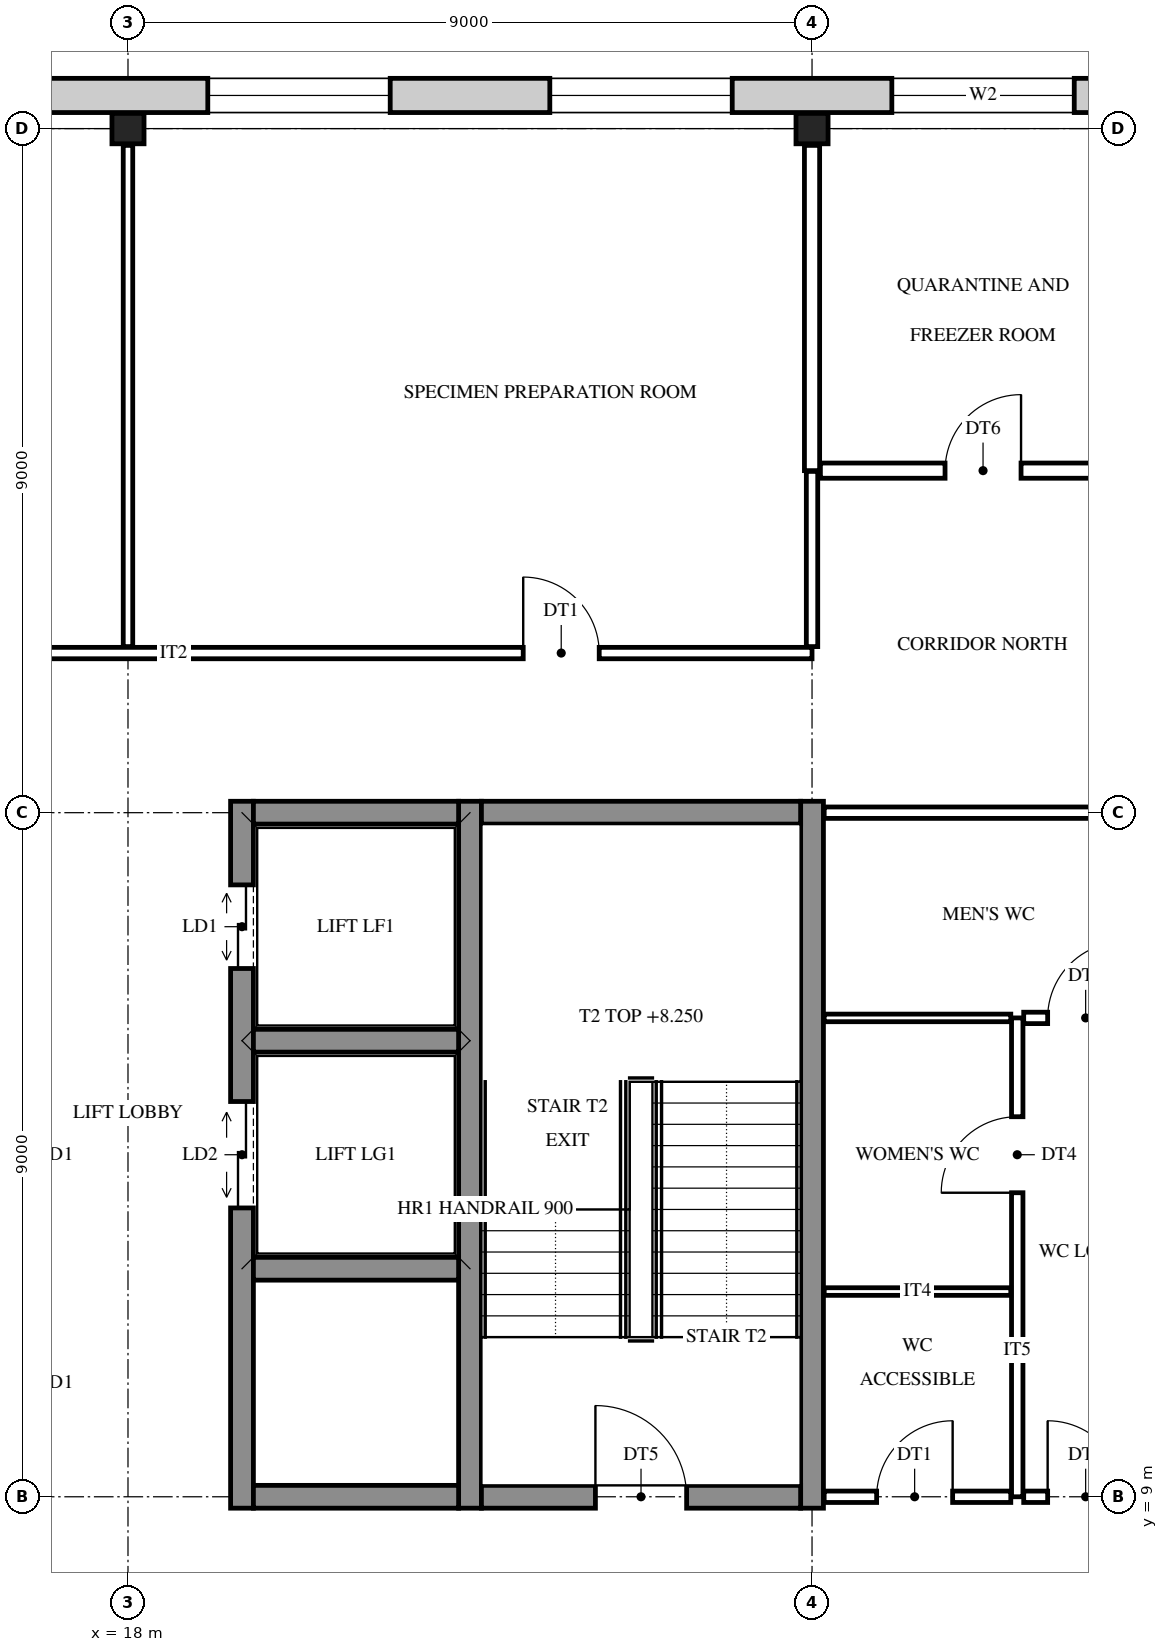
"""IFC4 building model, lengths in metres.
Left out: names, types, materials, properties, quantities, classifications, styles, units other than length and angle.
Written with IfcOpenShell. Run it as: python <this file> out.ifc"""

import sys

from ifc_helpers import new_model, si_unit, direction, frame, frame_2d, origin, origin_2d, place, context, subcontext, project, spatial, rectangle, i_section, extrude, element, fill, save


model = new_model("IFC4")
c1 = context("Model", 3, precision=1e-05, world=origin(), true_north=direction((0.0, 1.0)))
c2 = subcontext(c1, "Body", "Model", "MODEL_VIEW")
j1 = project(units=[si_unit("LENGTHUNIT", "METRE"), si_unit("PLANEANGLEUNIT", "RADIAN")], contexts=[c1])
p1 = place(None, origin())
s1 = spatial("IfcSite", under=j1, at=p1, CompositionType="ELEMENT")
p2 = place(p1, origin())
s2 = spatial("IfcBuilding", under=s1, at=p2, CompositionType="ELEMENT")
p3 = place(p2, frame((0.0, 0.0, 6.0)))
s3 = spatial("IfcBuildingStorey", under=s2, at=p3, CompositionType="ELEMENT", Elevation=6.0)
for number, where, z_axis, x_axis in (
    (1, (18.0, 27.0, 0.0), (0.0, 0.0, 1.0), (0.0, 1.0, 0.0)),
    (2, (27.0, 27.0, 0.0), (0.0, 0.0, 1.0), (0.0, 1.0, 0.0)),
):
    element("IfcColumn", number, at=place(p3, frame(where, z_axis=z_axis, x_axis=x_axis)), inside=s3, PredefinedType="COLUMN", context=c2, shape_type="SweptSolid", body=[
        extrude(i_section(OverallWidth=0.4, OverallDepth=0.422, WebThickness=0.028, FlangeThickness=0.036, at=origin_2d()), origin(), (0.0, 0.0, 1.0), 4.5),
    ])
p4 = place(p3, frame((19.5, 8.85, 0.0), z_axis=(0.0, 0.0, 1.0), x_axis=(0.0, 1.0, 0.0)))
e3 = element("IfcWall", 3, at=p4, inside=s3, PredefinedType="SHEAR", context=c2, shape_type="SweptSolid", body=[
    extrude(rectangle(XDim=9.3, YDim=0.3, at=frame_2d((4.65, 0.0))), origin(), (0.0, 0.0, 1.0), 4.5),
])
p5 = place(p4, frame((3.95, 0.0, 0.0)))
e4 = element("IfcOpeningElement", 4, at=p5, cuts=e3, PredefinedType="OPENING", context=c2, shape_type="SweptSolid", body=[
    extrude(rectangle(XDim=1.4, YDim=2.1, at=frame_2d((0.7, 1.05))), frame((0.0, 0.16, 0.0), z_axis=(0.0, -1.0, 0.0), x_axis=(1.0, 0.0, 0.0)), (0.0, 0.0, 1.0), 0.32),
])
p6 = place(p4, frame((7.1, 0.0, 0.0)))
e5 = element("IfcOpeningElement", 5, at=p6, cuts=e3, PredefinedType="OPENING", context=c2, shape_type="SweptSolid", body=[
    extrude(rectangle(XDim=1.1, YDim=2.1, at=frame_2d((0.55, 1.05))), frame((0.0, 0.16, 0.0), z_axis=(0.0, -1.0, 0.0), x_axis=(1.0, 0.0, 0.0)), (0.0, 0.0, 1.0), 0.32),
])
for number, where, z_axis, x_axis in (
    (6, (22.5, 8.85, 0.0), (0.0, 0.0, 1.0), (0.0, 1.0, 0.0)),
    (7, (27.0, 8.85, 0.0), (0.0, 0.0, 1.0), (0.0, 1.0, 0.0)),
):
    element("IfcWall", number, at=place(p3, frame(where, z_axis=z_axis, x_axis=x_axis)), inside=s3, PredefinedType="SHEAR", context=c2, shape_type="SweptSolid", body=[
        extrude(rectangle(XDim=9.3, YDim=0.3, at=frame_2d((4.65, 0.0))), origin(), (0.0, 0.0, 1.0), 4.5),
    ])
p7 = place(p3, frame((19.65, 9.0, 0.0), z_axis=(0.0, 0.0, 1.0), x_axis=(1.0, 0.0, 0.0)))
e8 = element("IfcWall", 8, at=p7, inside=s3, PredefinedType="SHEAR", context=c2, shape_type="SweptSolid", body=[
    extrude(rectangle(XDim=2.7, YDim=0.3, at=frame_2d((1.35, 0.0))), origin(), (0.0, 0.0, 1.0), 4.5),
])
p8 = place(p3, frame((22.65, 9.0, 0.0), z_axis=(0.0, 0.0, 1.0), x_axis=(1.0, 0.0, 0.0)))
e9 = element("IfcWall", 9, at=p8, inside=s3, PredefinedType="SHEAR", context=c2, shape_type="SweptSolid", body=[
    extrude(rectangle(XDim=4.2, YDim=0.3, at=frame_2d((2.1, 0.0))), origin(), (0.0, 0.0, 1.0), 4.5),
])
p9 = place(p8, frame((1.5, 0.0, 0.0)))
e10 = element("IfcOpeningElement", 10, at=p9, cuts=e9, PredefinedType="OPENING", context=c2, shape_type="SweptSolid", body=[
    extrude(rectangle(XDim=1.2, YDim=2.1, at=frame_2d((0.6, 1.05))), frame((0.0, 0.16, 0.0), z_axis=(0.0, -1.0, 0.0), x_axis=(1.0, 0.0, 0.0)), (0.0, 0.0, 1.0), 0.32),
])
for number, where, z_axis, x_axis in (
    (11, (19.65, 12.0, 0.0), (0.0, 0.0, 1.0), (1.0, 0.0, 0.0)),
    (12, (19.65, 15.0, 0.0), (0.0, 0.0, 1.0), (1.0, 0.0, 0.0)),
    (13, (19.65, 18.0, 0.0), (0.0, 0.0, 1.0), (1.0, 0.0, 0.0)),
):
    element("IfcWall", number, at=place(p3, frame(where, z_axis=z_axis, x_axis=x_axis)), inside=s3, PredefinedType="SHEAR", context=c2, shape_type="SweptSolid", body=[
        extrude(rectangle(XDim=2.7, YDim=0.3, at=frame_2d((1.35, 0.0))), origin(), (0.0, 0.0, 1.0), 4.5),
    ])
p10 = place(p3, frame((22.65, 18.0, 0.0), z_axis=(0.0, 0.0, 1.0), x_axis=(1.0, 0.0, 0.0)))
e14 = element("IfcWall", 14, at=p10, inside=s3, PredefinedType="SHEAR", context=c2, shape_type="SweptSolid", body=[
    extrude(rectangle(XDim=4.2, YDim=0.3, at=frame_2d((2.1, 0.0))), origin(), (0.0, 0.0, 1.0), 4.5),
])
p11 = place(p3, frame((-0.65, 27.436, 0.0), z_axis=(0.0, 0.0, 1.0), x_axis=(1.0, 0.0, 0.0)))
e15 = element("IfcWall", 15, at=p11, inside=s3, PredefinedType="STANDARD", context=c2, shape_type="SweptSolid", body=[
    extrude(rectangle(XDim=32.8, YDim=0.45, at=frame_2d((16.4, 0.0))), origin(), (0.0, 0.0, 1.0), 4.5),
])
p12 = place(p11, frame((1.7, 0.0, 0.9)))
e16 = element("IfcOpeningElement", 16, at=p12, cuts=e15, PredefinedType="OPENING", context=c2, shape_type="SweptSolid", body=[
    extrude(rectangle(XDim=2.4, YDim=2.8, at=frame_2d((1.2, 1.4))), frame((0.0, 0.235, 0.0), z_axis=(0.0, -1.0, 0.0), x_axis=(1.0, 0.0, 0.0)), (0.0, 0.0, 1.0), 0.47),
])
p13 = place(p11, frame((6.2, 0.0, 0.9)))
e17 = element("IfcOpeningElement", 17, at=p13, cuts=e15, PredefinedType="OPENING", context=c2, shape_type="SweptSolid", body=[
    extrude(rectangle(XDim=2.4, YDim=2.8, at=frame_2d((1.2, 1.4))), frame((0.0, 0.235, 0.0), z_axis=(0.0, -1.0, 0.0), x_axis=(1.0, 0.0, 0.0)), (0.0, 0.0, 1.0), 0.47),
])
p14 = place(p11, frame((10.7, 0.0, 0.9)))
e18 = element("IfcOpeningElement", 18, at=p14, cuts=e15, PredefinedType="OPENING", context=c2, shape_type="SweptSolid", body=[
    extrude(rectangle(XDim=2.4, YDim=2.8, at=frame_2d((1.2, 1.4))), frame((0.0, 0.235, 0.0), z_axis=(0.0, -1.0, 0.0), x_axis=(1.0, 0.0, 0.0)), (0.0, 0.0, 1.0), 0.47),
])
p15 = place(p11, frame((15.2, 0.0, 0.9)))
e19 = element("IfcOpeningElement", 19, at=p15, cuts=e15, PredefinedType="OPENING", context=c2, shape_type="SweptSolid", body=[
    extrude(rectangle(XDim=2.4, YDim=2.8, at=frame_2d((1.2, 1.4))), frame((0.0, 0.235, 0.0), z_axis=(0.0, -1.0, 0.0), x_axis=(1.0, 0.0, 0.0)), (0.0, 0.0, 1.0), 0.47),
])
p16 = place(p11, frame((19.7, 0.0, 0.9)))
e20 = element("IfcOpeningElement", 20, at=p16, cuts=e15, PredefinedType="OPENING", context=c2, shape_type="SweptSolid", body=[
    extrude(rectangle(XDim=2.4, YDim=2.8, at=frame_2d((1.2, 1.4))), frame((0.0, 0.235, 0.0), z_axis=(0.0, -1.0, 0.0), x_axis=(1.0, 0.0, 0.0)), (0.0, 0.0, 1.0), 0.47),
])
p17 = place(p11, frame((24.2, 0.0, 0.9)))
e21 = element("IfcOpeningElement", 21, at=p17, cuts=e15, PredefinedType="OPENING", context=c2, shape_type="SweptSolid", body=[
    extrude(rectangle(XDim=2.4, YDim=2.8, at=frame_2d((1.2, 1.4))), frame((0.0, 0.235, 0.0), z_axis=(0.0, -1.0, 0.0), x_axis=(1.0, 0.0, 0.0)), (0.0, 0.0, 1.0), 0.47),
])
p18 = place(p11, frame((28.7, 0.0, 0.9)))
e22 = element("IfcOpeningElement", 22, at=p18, cuts=e15, PredefinedType="OPENING", context=c2, shape_type="SweptSolid", body=[
    extrude(rectangle(XDim=2.4, YDim=2.8, at=frame_2d((1.2, 1.4))), frame((0.0, 0.235, 0.0), z_axis=(0.0, -1.0, 0.0), x_axis=(1.0, 0.0, 0.0)), (0.0, 0.0, 1.0), 0.47),
])
p19 = place(p3, frame((18.0, 20.185, 0.0), z_axis=(0.0, 0.0, 1.0), x_axis=(0.0, 1.0, 0.0)))
e23 = element("IfcWall", 23, at=p19, inside=s3, PredefinedType="PARTITIONING", context=c2, shape_type="SweptSolid", body=[
    extrude(rectangle(XDim=6.594, YDim=0.125, at=frame_2d((3.297, 0.0))), origin(), (0.0, 0.0, 1.0), 3.718),
])
p20 = place(p3, frame((27.0, 20.185, 0.0), z_axis=(0.0, 0.0, 1.0), x_axis=(0.0, 1.0, 0.0)))
e24 = element("IfcWall", 24, at=p20, inside=s3, PredefinedType="PARTITIONING", context=c2, shape_type="SweptSolid", body=[
    extrude(rectangle(XDim=2.305, YDim=0.15, at=frame_2d((1.152, 0.0))), origin(), (0.0, 0.0, 1.0), 3.718),
])
p21 = place(p3, frame((27.0, 22.5, 0.0), z_axis=(0.0, 0.0, 1.0), x_axis=(0.0, 1.0, 0.0)))
e25 = element("IfcWall", 25, at=p21, inside=s3, PredefinedType="PARTITIONING", context=c2, shape_type="SweptSolid", body=[
    extrude(rectangle(XDim=4.279, YDim=0.2, at=frame_2d((2.14, 0.0))), origin(), (0.0, 0.0, 1.0), 3.718),
])
p22 = place(p3, frame((29.7, 9.0, 0.0), z_axis=(0.0, 0.0, 1.0), x_axis=(0.0, 1.0, 0.0)))
e26 = element("IfcWall", 26, at=p22, inside=s3, PredefinedType="PARTITIONING", context=c2, shape_type="SweptSolid", body=[
    extrude(rectangle(XDim=6.3, YDim=0.15, at=frame_2d((3.15, 0.0))), origin(), (0.0, 0.0, 1.0), 3.718),
])
p23 = place(p22, frame((4.0, 0.0, 0.0)))
e27 = element("IfcOpeningElement", 27, at=p23, cuts=e26, PredefinedType="OPENING", context=c2, shape_type="SweptSolid", body=[
    extrude(rectangle(XDim=1.0, YDim=2.1, at=frame_2d((0.5, 1.05))), frame((0.0, 0.085, 0.0), z_axis=(0.0, -1.0, 0.0), x_axis=(1.0, 0.0, 0.0)), (0.0, 0.0, 1.0), 0.17),
])
p24 = place(p3, frame((27.16, 9.0, 0.0), z_axis=(0.0, 0.0, 1.0), x_axis=(1.0, 0.0, 0.0)))
e28 = element("IfcWall", 28, at=p24, inside=s3, PredefinedType="PARTITIONING", context=c2, shape_type="SweptSolid", body=[
    extrude(rectangle(XDim=2.455, YDim=0.15, at=frame_2d((1.228, 0.0))), origin(), (0.0, 0.0, 1.0), 3.718),
])
p25 = place(p24, frame((0.69, 0.0, 0.0)))
e29 = element("IfcOpeningElement", 29, at=p25, cuts=e28, PredefinedType="OPENING", context=c2, shape_type="SweptSolid", body=[
    extrude(rectangle(XDim=1.0, YDim=2.1, at=frame_2d((0.5, 1.05))), frame((0.0, 0.085, 0.0), z_axis=(0.0, -1.0, 0.0), x_axis=(1.0, 0.0, 0.0)), (0.0, 0.0, 1.0), 0.17),
])
p26 = place(p3, frame((29.785, 9.0, 0.0), z_axis=(0.0, 0.0, 1.0), x_axis=(1.0, 0.0, 0.0)))
e30 = element("IfcWall", 30, at=p26, inside=s3, PredefinedType="PARTITIONING", context=c2, shape_type="SweptSolid", body=[
    extrude(rectangle(XDim=1.505, YDim=0.15, at=frame_2d((0.752, 0.0))), origin(), (0.0, 0.0, 1.0), 3.718),
])
p27 = place(p26, frame((0.315, 0.0, 0.0)))
e31 = element("IfcOpeningElement", 31, at=p27, cuts=e30, PredefinedType="OPENING", context=c2, shape_type="SweptSolid", body=[
    extrude(rectangle(XDim=1.0, YDim=2.1, at=frame_2d((0.5, 1.05))), frame((0.0, 0.085, 0.0), z_axis=(0.0, -1.0, 0.0), x_axis=(1.0, 0.0, 0.0)), (0.0, 0.0, 1.0), 0.17),
])
for number, where, z_axis, x_axis in (
    (32, (27.16, 11.7, 0.0), (0.0, 0.0, 1.0), (1.0, 0.0, 0.0)),
    (33, (27.16, 15.3, 0.0), (0.0, 0.0, 1.0), (1.0, 0.0, 0.0)),
):
    element("IfcWall", number, at=place(p3, frame(where, z_axis=z_axis, x_axis=x_axis)), inside=s3, PredefinedType="PARTITIONING", context=c2, shape_type="SweptSolid", body=[
        extrude(rectangle(XDim=2.455, YDim=0.1, at=frame_2d((1.228, 0.0))), origin(), (0.0, 0.0, 1.0), 3.718),
    ])
p28 = place(p3, frame((29.785, 15.3, 0.0), z_axis=(0.0, 0.0, 1.0), x_axis=(1.0, 0.0, 0.0)))
e34 = element("IfcWall", 34, at=p28, inside=s3, PredefinedType="PARTITIONING", context=c2, shape_type="SweptSolid", body=[
    extrude(rectangle(XDim=1.705, YDim=0.15, at=frame_2d((0.853, 0.0))), origin(), (0.0, 0.0, 1.0), 3.718),
])
p29 = place(p28, frame((0.315, 0.0, 0.0)))
e35 = element("IfcOpeningElement", 35, at=p29, cuts=e34, PredefinedType="OPENING", context=c2, shape_type="SweptSolid", body=[
    extrude(rectangle(XDim=1.0, YDim=2.1, at=frame_2d((0.5, 1.05))), frame((0.0, 0.085, 0.0), z_axis=(0.0, -1.0, 0.0), x_axis=(1.0, 0.0, 0.0)), (0.0, 0.0, 1.0), 0.17),
])
p30 = place(p3, frame((27.16, 18.0, 0.0), z_axis=(0.0, 0.0, 1.0), x_axis=(1.0, 0.0, 0.0)))
e36 = element("IfcWall", 36, at=p30, inside=s3, PredefinedType="PARTITIONING", context=c2, shape_type="SweptSolid", body=[
    extrude(rectangle(XDim=4.13, YDim=0.15, at=frame_2d((2.065, 0.0))), origin(), (0.0, 0.0, 1.0), 3.718),
])
p31 = place(p3, frame((6.9, 20.1, 0.0), z_axis=(0.0, 0.0, 1.0), x_axis=(1.0, 0.0, 0.0)))
e37 = element("IfcWall", 37, at=p31, inside=s3, PredefinedType="PARTITIONING", context=c2, shape_type="SweptSolid", body=[
    extrude(rectangle(XDim=20.1, YDim=0.15, at=frame_2d((10.05, 0.0))), origin(), (0.0, 0.0, 1.0), 3.718),
])
p32 = place(p31, frame((0.15, 0.0, 0.0)))
e38 = element("IfcOpeningElement", 38, at=p32, cuts=e37, PredefinedType="OPENING", context=c2, shape_type="SweptSolid", body=[
    extrude(rectangle(XDim=1.0, YDim=2.1, at=frame_2d((0.5, 1.05))), frame((0.0, 0.085, 0.0), z_axis=(0.0, -1.0, 0.0), x_axis=(1.0, 0.0, 0.0)), (0.0, 0.0, 1.0), 0.17),
])
p33 = place(p31, frame((6.1, 0.0, 0.0)))
e39 = element("IfcOpeningElement", 39, at=p33, cuts=e37, PredefinedType="OPENING", context=c2, shape_type="SweptSolid", body=[
    extrude(rectangle(XDim=1.0, YDim=2.1, at=frame_2d((0.5, 1.05))), frame((0.0, 0.085, 0.0), z_axis=(0.0, -1.0, 0.0), x_axis=(1.0, 0.0, 0.0)), (0.0, 0.0, 1.0), 0.17),
])
p34 = place(p31, frame((16.3, 0.0, 0.0)))
e40 = element("IfcOpeningElement", 40, at=p34, cuts=e37, PredefinedType="OPENING", context=c2, shape_type="SweptSolid", body=[
    extrude(rectangle(XDim=1.0, YDim=2.1, at=frame_2d((0.5, 1.05))), frame((0.0, 0.085, 0.0), z_axis=(0.0, -1.0, 0.0), x_axis=(1.0, 0.0, 0.0)), (0.0, 0.0, 1.0), 0.17),
])
p35 = place(p3, frame((27.11, 22.5, 0.0), z_axis=(0.0, 0.0, 1.0), x_axis=(1.0, 0.0, 0.0)))
e41 = element("IfcWall", 41, at=p35, inside=s3, PredefinedType="PARTITIONING", context=c2, shape_type="SweptSolid", body=[
    extrude(rectangle(XDim=4.255, YDim=0.2, at=frame_2d((2.127, 0.0))), origin(), (0.0, 0.0, 1.0), 3.718),
])
p36 = place(p35, frame((1.64, 0.0, 0.0)))
e42 = element("IfcOpeningElement", 42, at=p36, cuts=e41, PredefinedType="OPENING", context=c2, shape_type="SweptSolid", body=[
    extrude(rectangle(XDim=1.0, YDim=2.1, at=frame_2d((0.5, 1.05))), frame((0.0, 0.11, 0.0), z_axis=(0.0, -1.0, 0.0), x_axis=(1.0, 0.0, 0.0)), (0.0, 0.0, 1.0), 0.22),
])
p37 = place(p16, origin())
e43 = element("IfcWindow", 43, at=p37, inside=s3, PartitioningType="SINGLE_PANEL", PredefinedType="WINDOW", context=c2, shape_type="SweptSolid", body=[
    extrude(rectangle(XDim=2.4, YDim=2.8, at=frame_2d((1.2, 1.4))), frame((0.0, 0.03, 0.0), z_axis=(0.0, -1.0, 0.0), x_axis=(1.0, 0.0, 0.0)), (0.0, 0.0, 1.0), 0.06),
])
fill(e20, e43)
p38 = place(p17, origin())
e44 = element("IfcWindow", 44, at=p38, inside=s3, PartitioningType="SINGLE_PANEL", PredefinedType="WINDOW", context=c2, shape_type="SweptSolid", body=[
    extrude(rectangle(XDim=2.4, YDim=2.8, at=frame_2d((1.2, 1.4))), frame((0.0, 0.03, 0.0), z_axis=(0.0, -1.0, 0.0), x_axis=(1.0, 0.0, 0.0)), (0.0, 0.0, 1.0), 0.06),
])
fill(e21, e44)
p39 = place(p18, origin())
e45 = element("IfcWindow", 45, at=p39, inside=s3, PartitioningType="SINGLE_PANEL", PredefinedType="WINDOW", context=c2, shape_type="SweptSolid", body=[
    extrude(rectangle(XDim=2.4, YDim=2.8, at=frame_2d((1.2, 1.4))), frame((0.0, 0.03, 0.0), z_axis=(0.0, -1.0, 0.0), x_axis=(1.0, 0.0, 0.0)), (0.0, 0.0, 1.0), 0.06),
])
fill(e22, e45)
p40 = place(p9, origin())
e46 = element("IfcDoor", 46, at=p40, inside=s3, OperationType="SINGLE_SWING_LEFT", PredefinedType="DOOR", context=c2, shape_type="SweptSolid", body=[
    extrude(rectangle(XDim=1.2, YDim=2.1, at=frame_2d((0.6, 1.05))), frame((0.0, 0.025, 0.0), z_axis=(0.0, -1.0, 0.0), x_axis=(1.0, 0.0, 0.0)), (0.0, 0.0, 1.0), 0.05),
])
fill(e10, e46)
p41 = place(p25, origin())
e47 = element("IfcDoor", 47, at=p41, inside=s3, OperationType="SINGLE_SWING_RIGHT", PredefinedType="DOOR", context=c2, shape_type="SweptSolid", body=[
    extrude(rectangle(XDim=1.0, YDim=2.1, at=frame_2d((0.5, 1.05))), frame((0.0, 0.025, 0.0), z_axis=(0.0, -1.0, 0.0), x_axis=(1.0, 0.0, 0.0)), (0.0, 0.0, 1.0), 0.05),
])
fill(e29, e47)
p42 = place(p23, origin())
e48 = element("IfcDoor", 48, at=p42, inside=s3, OperationType="SINGLE_SWING_LEFT", PredefinedType="DOOR", context=c2, shape_type="SweptSolid", body=[
    extrude(rectangle(XDim=1.0, YDim=2.1, at=frame_2d((0.5, 1.05))), frame((0.0, 0.025, 0.0), z_axis=(0.0, -1.0, 0.0), x_axis=(1.0, 0.0, 0.0)), (0.0, 0.0, 1.0), 0.05),
])
fill(e27, e48)
p43 = place(p29, origin())
e49 = element("IfcDoor", 49, at=p43, inside=s3, OperationType="SINGLE_SWING_RIGHT", PredefinedType="DOOR", context=c2, shape_type="SweptSolid", body=[
    extrude(rectangle(XDim=1.0, YDim=2.1, at=frame_2d((0.5, 1.05))), frame((0.0, 0.025, 0.0), z_axis=(0.0, -1.0, 0.0), x_axis=(1.0, 0.0, 0.0)), (0.0, 0.0, 1.0), 0.05),
])
fill(e35, e49)
p44 = place(p27, origin())
e50 = element("IfcDoor", 50, at=p44, inside=s3, OperationType="SINGLE_SWING_LEFT", PredefinedType="DOOR", context=c2, shape_type="SweptSolid", body=[
    extrude(rectangle(XDim=1.0, YDim=2.1, at=frame_2d((0.5, 1.05))), frame((0.0, 0.025, 0.0), z_axis=(0.0, -1.0, 0.0), x_axis=(1.0, 0.0, 0.0)), (0.0, 0.0, 1.0), 0.05),
])
fill(e31, e50)
p45 = place(p34, origin())
e51 = element("IfcDoor", 51, at=p45, inside=s3, OperationType="SINGLE_SWING_LEFT", PredefinedType="DOOR", context=c2, shape_type="SweptSolid", body=[
    extrude(rectangle(XDim=1.0, YDim=2.1, at=frame_2d((0.5, 1.05))), frame((0.0, 0.025, 0.0), z_axis=(0.0, -1.0, 0.0), x_axis=(1.0, 0.0, 0.0)), (0.0, 0.0, 1.0), 0.05),
])
fill(e40, e51)
p46 = place(p36, origin())
e52 = element("IfcDoor", 52, at=p46, inside=s3, OperationType="SINGLE_SWING_RIGHT", PredefinedType="DOOR", context=c2, shape_type="SweptSolid", body=[
    extrude(rectangle(XDim=1.0, YDim=2.1, at=frame_2d((0.5, 1.05))), frame((0.0, 0.025, 0.0), z_axis=(0.0, -1.0, 0.0), x_axis=(1.0, 0.0, 0.0)), (0.0, 0.0, 1.0), 0.05),
])
fill(e42, e52)
p47 = place(p5, origin())
e53 = element("IfcDoor", 53, at=p47, inside=s3, OperationType="DOUBLE_DOOR_SLIDING", PredefinedType="DOOR", context=c2, shape_type="SweptSolid", body=[
    extrude(rectangle(XDim=1.4, YDim=2.1, at=frame_2d((0.7, 1.05))), frame((0.0, 0.025, 0.0), z_axis=(0.0, -1.0, 0.0), x_axis=(1.0, 0.0, 0.0)), (0.0, 0.0, 1.0), 0.05),
])
fill(e4, e53)
p48 = place(p6, origin())
e54 = element("IfcDoor", 54, at=p48, inside=s3, OperationType="DOUBLE_DOOR_SLIDING", PredefinedType="DOOR", context=c2, shape_type="SweptSolid", body=[
    extrude(rectangle(XDim=1.1, YDim=2.1, at=frame_2d((0.55, 1.05))), frame((0.0, 0.025, 0.0), z_axis=(0.0, -1.0, 0.0), x_axis=(1.0, 0.0, 0.0)), (0.0, 0.0, 1.0), 0.05),
])
fill(e5, e54)
save(model, sys.argv[1])
